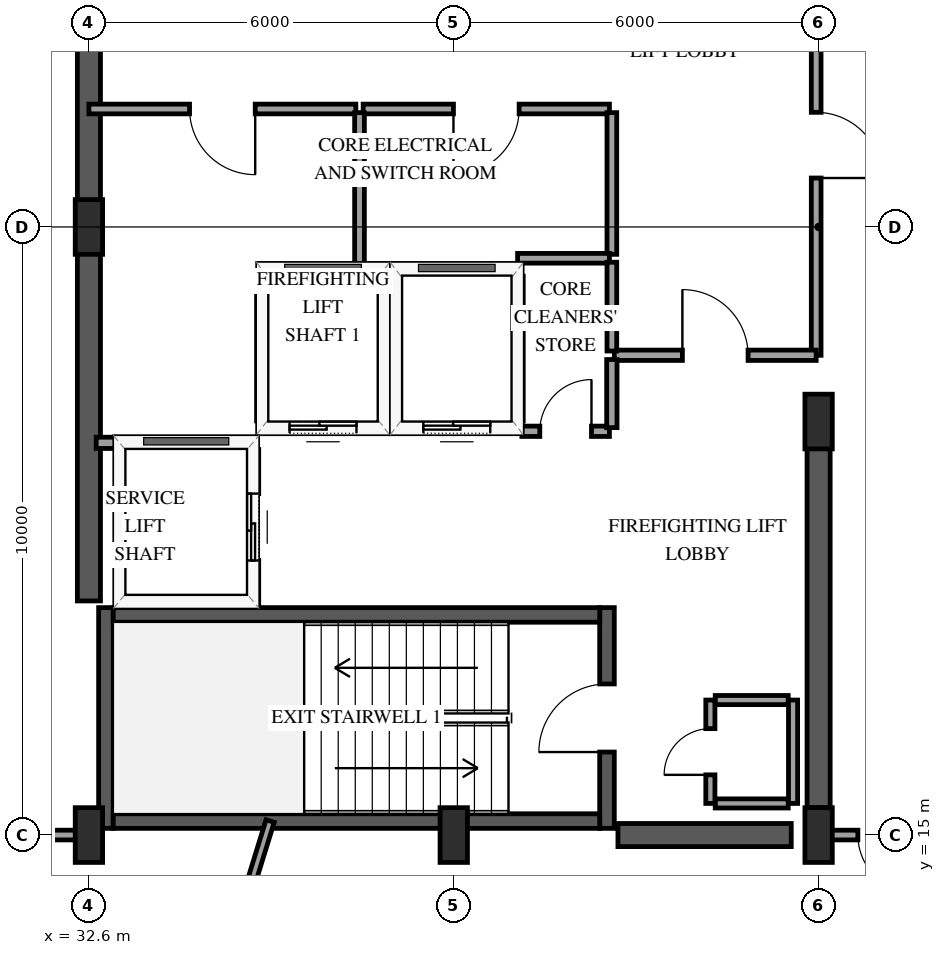
"""IFC4 building model, lengths in metres.
Left out: names, types, materials, properties, quantities, classifications, styles, units other than length and angle.
Written with IfcOpenShell. Run it as: python <this file> out.ifc"""

import sys

from ifc_helpers import new_model, si_unit, direction, frame, frame_2d, origin, origin_2d, place, context, subcontext, project, spatial, rectangle, extrude, element, fill, save


model = new_model("IFC4")
c1 = context("Model", 3, precision=1e-05, world=origin(), true_north=direction((0.0, 1.0)))
c2 = subcontext(c1, "Body", "Model", "MODEL_VIEW")
j1 = project(units=[si_unit("LENGTHUNIT", "METRE"), si_unit("PLANEANGLEUNIT", "RADIAN")], contexts=[c1])
p1 = place(None, origin())
s1 = spatial("IfcSite", under=j1, at=p1, CompositionType="ELEMENT")
p2 = place(p1, origin())
s2 = spatial("IfcBuilding", under=s1, at=p2, CompositionType="ELEMENT")
p3 = place(p2, frame((0.0, 0.0, 288.55)))
s3 = spatial("IfcBuildingStorey", under=s2, at=p3, CompositionType="ELEMENT", Elevation=288.55)
p4 = place(p3, frame((32.88, 15.11, 0.0), z_axis=(0.0, 0.0, 1.0), x_axis=(0.0, 1.0, 0.0)))
e1 = element("IfcWall", 1, at=p4, inside=s3, PredefinedType="SHEAR", context=c2, shape_type="SweptSolid", body=[
    extrude(rectangle(XDim=3.63, YDim=0.24, at=frame_2d((1.815, 0.0))), origin(), (0.0, 0.0, 1.0), 4.5),
])
p5 = place(p3, frame((41.12, 15.11, 0.0), z_axis=(0.0, 0.0, 1.0), x_axis=(0.0, 1.0, 0.0)))
e2 = element("IfcWall", 2, at=p5, inside=s3, PredefinedType="SHEAR", context=c2, shape_type="SweptSolid", body=[
    extrude(rectangle(XDim=3.63, YDim=0.24, at=frame_2d((1.815, 0.0))), origin(), (0.0, 0.0, 1.0), 4.5),
])
p6 = place(p5, frame((1.255, 0.0, 0.0)))
e3 = element("IfcOpeningElement", 3, at=p6, cuts=e2, PredefinedType="OPENING", context=c2, shape_type="SweptSolid", body=[
    extrude(rectangle(XDim=1.12, YDim=2.15, at=frame_2d((0.56, 1.075))), frame((0.0, 0.13, 0.0), z_axis=(0.0, -1.0, 0.0), x_axis=(1.0, 0.0, 0.0)), (0.0, 0.0, 1.0), 0.26),
])
for number, where, z_axis, x_axis in (
    (4, (33.0, 15.23, 0.0), (0.0, 0.0, 1.0), (1.0, 0.0, 0.0)),
    (5, (33.0, 18.62, 0.0), (0.0, 0.0, 1.0), (1.0, 0.0, 0.0)),
):
    element("IfcWall", number, at=place(p3, frame(where, z_axis=z_axis, x_axis=x_axis)), inside=s3, PredefinedType="SHEAR", context=c2, shape_type="SweptSolid", body=[
        extrude(rectangle(XDim=8.0, YDim=0.24, at=frame_2d((4.0, 0.0))), origin(), (0.0, 0.0, 1.0), 4.5),
    ])
p7 = place(p3, frame((32.6, 18.85, 0.0), z_axis=(0.0, 0.0, 1.0), x_axis=(0.0, 1.0, 0.0)))
e6 = element("IfcWall", 6, at=p7, inside=s3, PredefinedType="SHEAR", context=c2, shape_type="SweptSolid", body=[
    extrude(rectangle(XDim=12.3, YDim=0.38, at=frame_2d((6.15, 0.0))), origin(), (0.0, 0.0, 1.0), 4.5),
])
p8 = place(p3, frame((41.3, 15.0, 0.0), z_axis=(0.0, 0.0, 1.0), x_axis=(1.0, 0.0, 0.0)))
e7 = element("IfcWall", 7, at=p8, inside=s3, PredefinedType="SHEAR", context=c2, shape_type="SweptSolid", body=[
    extrude(rectangle(XDim=2.85, YDim=0.38, at=frame_2d((1.425, 0.0))), origin(), (0.0, 0.0, 1.0), 4.5),
])
p9 = place(p3, frame((44.6, 15.45, 0.0), z_axis=(0.0, 0.0, 1.0), x_axis=(0.0, 1.0, 0.0)))
e8 = element("IfcWall", 8, at=p9, inside=s3, PredefinedType="SHEAR", context=c2, shape_type="SweptSolid", body=[
    extrude(rectangle(XDim=6.35, YDim=0.38, at=frame_2d((3.175, 0.0))), origin(), (0.0, 0.0, 1.0), 4.5),
])
for number, where, z_axis, x_axis in (
    (9, (32.6, 15.0, 0.0), (0.0, 0.0, 1.0), (1.0, 0.0, 0.0)),
    (10, (32.6, 25.0, 0.0), (0.0, 0.0, 1.0), (1.0, 0.0, 0.0)),
    (11, (38.6, 15.0, 0.0), (0.0, 0.0, 1.0), (1.0, 0.0, 0.0)),
    (12, (44.6, 15.0, 0.0), (0.0, 0.0, 1.0), (1.0, 0.0, 0.0)),
    (13, (44.6, 21.8, 0.0), (0.0, 0.0, 1.0), (1.0, 0.0, 0.0)),
):
    element("IfcColumn", number, at=place(p3, frame(where, z_axis=z_axis, x_axis=x_axis)), inside=s3, PredefinedType="PILASTER", context=c2, shape_type="SweptSolid", body=[
        extrude(rectangle(XDim=0.45, YDim=0.9, at=origin_2d()), origin(), (0.0, 0.0, 1.0), 4.195),
    ])
p10 = place(p3, frame((35.45, 21.7, 0.0), z_axis=(0.0, 0.0, 1.0), x_axis=(1.0, 0.0, 0.0)))
e14 = element("IfcWall", 14, at=p10, inside=s3, PredefinedType="SOLIDWALL", context=c2, shape_type="SweptSolid", body=[
    extrude(rectangle(XDim=2.0, YDim=0.185, at=frame_2d((1.0, 0.0))), origin(), (0.0, 0.0, 1.0), 4.195),
])
p11 = place(p10, frame((0.45, 0.0, 0.0)))
e15 = element("IfcOpeningElement", 15, at=p11, cuts=e14, PredefinedType="OPENING", context=c2, shape_type="SweptSolid", body=[
    extrude(rectangle(XDim=1.1, YDim=2.15, at=frame_2d((0.55, 1.075))), frame((0.0, 0.103, 0.0), z_axis=(0.0, -1.0, 0.0), x_axis=(1.0, 0.0, 0.0)), (0.0, 0.0, 1.0), 0.205),
])
p12 = place(p3, frame((35.45, 24.3, 0.0), z_axis=(0.0, 0.0, 1.0), x_axis=(1.0, 0.0, 0.0)))
e16 = element("IfcWall", 16, at=p12, inside=s3, PredefinedType="SOLIDWALL", context=c2, shape_type="SweptSolid", body=[
    extrude(rectangle(XDim=2.0, YDim=0.185, at=frame_2d((1.0, 0.0))), origin(), (0.0, 0.0, 1.0), 4.195),
])
for number, where, z_axis, x_axis in (
    (17, (35.45, 21.81, 0.0), (0.0, 0.0, 1.0), (0.0, 1.0, 0.0)),
    (18, (37.45, 21.81, 0.0), (0.0, 0.0, 1.0), (0.0, 1.0, 0.0)),
):
    element("IfcWall", number, at=place(p3, frame(where, z_axis=z_axis, x_axis=x_axis)), inside=s3, PredefinedType="SOLIDWALL", context=c2, shape_type="SweptSolid", body=[
        extrude(rectangle(XDim=2.38, YDim=0.185, at=frame_2d((1.19, 0.0))), origin(), (0.0, 0.0, 1.0), 4.195),
    ])
p13 = place(p3, frame((37.65, 21.7, 0.0), z_axis=(0.0, 0.0, 1.0), x_axis=(1.0, 0.0, 0.0)))
e19 = element("IfcWall", 19, at=p13, inside=s3, PredefinedType="SOLIDWALL", context=c2, shape_type="SweptSolid", body=[
    extrude(rectangle(XDim=2.0, YDim=0.185, at=frame_2d((1.0, 0.0))), origin(), (0.0, 0.0, 1.0), 4.195),
])
p14 = place(p13, frame((0.45, 0.0, 0.0)))
e20 = element("IfcOpeningElement", 20, at=p14, cuts=e19, PredefinedType="OPENING", context=c2, shape_type="SweptSolid", body=[
    extrude(rectangle(XDim=1.1, YDim=2.15, at=frame_2d((0.55, 1.075))), frame((0.0, 0.103, 0.0), z_axis=(0.0, -1.0, 0.0), x_axis=(1.0, 0.0, 0.0)), (0.0, 0.0, 1.0), 0.205),
])
p15 = place(p3, frame((37.65, 24.3, 0.0), z_axis=(0.0, 0.0, 1.0), x_axis=(1.0, 0.0, 0.0)))
e21 = element("IfcWall", 21, at=p15, inside=s3, PredefinedType="SOLIDWALL", context=c2, shape_type="SweptSolid", body=[
    extrude(rectangle(XDim=2.0, YDim=0.185, at=frame_2d((1.0, 0.0))), origin(), (0.0, 0.0, 1.0), 4.195),
])
p16 = place(p3, frame((39.65, 21.81, 0.0), z_axis=(0.0, 0.0, 1.0), x_axis=(0.0, 1.0, 0.0)))
e22 = element("IfcWall", 22, at=p16, inside=s3, PredefinedType="SOLIDWALL", context=c2, shape_type="SweptSolid", body=[
    extrude(rectangle(XDim=2.38, YDim=0.185, at=frame_2d((1.19, 0.0))), origin(), (0.0, 0.0, 1.0), 4.195),
])
p17 = place(p3, frame((32.72, 21.45, 0.0), z_axis=(0.0, 0.0, 1.0), x_axis=(1.0, 0.0, 0.0)))
e23 = element("IfcWall", 23, at=p17, inside=s3, PredefinedType="SOLIDWALL", context=c2, shape_type="SweptSolid", body=[
    extrude(rectangle(XDim=2.58, YDim=0.185, at=frame_2d((1.29, 0.0))), origin(), (0.0, 0.0, 1.0), 4.195),
])
p18 = place(p3, frame((35.3, 18.79, 0.0), z_axis=(0.0, 0.0, 1.0), x_axis=(0.0, 1.0, 0.0)))
e24 = element("IfcWall", 24, at=p18, inside=s3, PredefinedType="SOLIDWALL", context=c2, shape_type="SweptSolid", body=[
    extrude(rectangle(XDim=2.55, YDim=0.185, at=frame_2d((1.275, 0.0))), origin(), (0.0, 0.0, 1.0), 4.195),
])
p19 = place(p18, frame((0.725, 0.0, 0.0)))
e25 = element("IfcOpeningElement", 25, at=p19, cuts=e24, PredefinedType="OPENING", context=c2, shape_type="SweptSolid", body=[
    extrude(rectangle(XDim=1.1, YDim=2.15, at=frame_2d((0.55, 1.075))), frame((0.0, 0.103, 0.0), z_axis=(0.0, -1.0, 0.0), x_axis=(1.0, 0.0, 0.0)), (0.0, 0.0, 1.0), 0.205),
])
for number, where, z_axis, x_axis in (
    (26, (42.9, 15.52, 0.0), (0.0, 0.0, 1.0), (1.0, 0.0, 0.0)),
    (27, (42.9, 17.22, 0.0), (0.0, 0.0, 1.0), (1.0, 0.0, 0.0)),
):
    element("IfcWall", number, at=place(p3, frame(where, z_axis=z_axis, x_axis=x_axis)), inside=s3, PredefinedType="PARTITIONING", context=c2, shape_type="SweptSolid", body=[
        extrude(rectangle(XDim=1.2, YDim=0.15, at=frame_2d((0.6, 0.0))), origin(), (0.0, 0.0, 1.0), 4.195),
    ])
p20 = place(p3, frame((44.18, 15.52, 0.0), z_axis=(0.0, 0.0, 1.0), x_axis=(0.0, 1.0, 0.0)))
e28 = element("IfcWall", 28, at=p20, inside=s3, PredefinedType="PARTITIONING", context=c2, shape_type="SweptSolid", body=[
    extrude(rectangle(XDim=1.7, YDim=0.15, at=frame_2d((0.85, 0.0))), origin(), (0.0, 0.0, 1.0), 4.195),
])
p21 = place(p3, frame((42.82, 15.52, 0.0), z_axis=(0.0, 0.0, 1.0), x_axis=(0.0, 1.0, 0.0)))
e29 = element("IfcWall", 29, at=p21, inside=s3, PredefinedType="PARTITIONING", context=c2, shape_type="SweptSolid", body=[
    extrude(rectangle(XDim=1.7, YDim=0.15, at=frame_2d((0.85, 0.0))), origin(), (0.0, 0.0, 1.0), 4.195),
])
p22 = place(p21, frame((0.47, 0.0, 0.0)))
e30 = element("IfcOpeningElement", 30, at=p22, cuts=e29, PredefinedType="OPENING", context=c2, shape_type="SweptSolid", body=[
    extrude(rectangle(XDim=0.76, YDim=2.0, at=frame_2d((0.38, 1.0))), frame((0.0, 0.085, 0.0), z_axis=(0.0, -1.0, 0.0), x_axis=(1.0, 0.0, 0.0)), (0.0, 0.0, 1.0), 0.17),
])
p23 = place(p3, frame((44.56, 29.8, 0.0), z_axis=(0.0, 0.0, 1.0), x_axis=(0.0, -1.0, 0.0)))
e31 = element("IfcWall", 31, at=p23, inside=s3, PredefinedType="PARTITIONING", context=c2, shape_type="SweptSolid", body=[
    extrude(rectangle(XDim=6.91, YDim=0.16, at=frame_2d((3.455, 0.0))), origin(), (0.0, 0.0, 1.0), 3.235),
])
p24 = place(p23, frame((2.915, 0.0, 0.0)))
e32 = element("IfcOpeningElement", 32, at=p24, cuts=e31, PredefinedType="OPENING", context=c2, shape_type="SweptSolid", body=[
    extrude(rectangle(XDim=1.08, YDim=2.15, at=frame_2d((0.54, 1.075))), frame((0.0, 0.09, 0.0), z_axis=(0.0, -1.0, 0.0), x_axis=(1.0, 0.0, 0.0)), (0.0, 0.0, 1.0), 0.18),
])
p25 = place(p3, frame((35.58, 15.23, 0.0), z_axis=(0.0, 0.0, 1.0), x_axis=(-0.295186233407, -0.955439735204, 0.0)))
e33 = element("IfcWall", 33, at=p25, inside=s3, PredefinedType="PARTITIONING", context=c2, shape_type="SweptSolid", body=[
    extrude(rectangle(XDim=4.692, YDim=0.14, at=frame_2d((2.346, 0.0))), origin(), (0.0, 0.0, 1.0), 2.485),
])
p26 = place(p3, frame((36.99, 26.94, 0.0), z_axis=(0.0, 0.0, 1.0), x_axis=(-1.0, 0.0, 0.0)))
e34 = element("IfcWall", 34, at=p26, inside=s3, PredefinedType="PARTITIONING", context=c2, shape_type="SweptSolid", body=[
    extrude(rectangle(XDim=4.39, YDim=0.16, at=frame_2d((2.195, 0.0))), origin(), (0.0, 0.0, 1.0), 4.195),
])
p27 = place(p26, frame((1.655, 0.0, 0.0)))
e35 = element("IfcOpeningElement", 35, at=p27, cuts=e34, PredefinedType="OPENING", context=c2, shape_type="SweptSolid", body=[
    extrude(rectangle(XDim=1.08, YDim=2.15, at=frame_2d((0.54, 1.075))), frame((0.0, 0.09, 0.0), z_axis=(0.0, -1.0, 0.0), x_axis=(1.0, 0.0, 0.0)), (0.0, 0.0, 1.0), 0.18),
])
p28 = place(p3, frame((41.16, 26.94, 0.0), z_axis=(0.0, 0.0, 1.0), x_axis=(-1.0, 0.0, 0.0)))
e36 = element("IfcWall", 36, at=p28, inside=s3, PredefinedType="PARTITIONING", context=c2, shape_type="SweptSolid", body=[
    extrude(rectangle(XDim=4.05, YDim=0.16, at=frame_2d((2.025, 0.0))), origin(), (0.0, 0.0, 1.0), 4.195),
])
p29 = place(p28, frame((1.485, 0.0, 0.0)))
e37 = element("IfcOpeningElement", 37, at=p29, cuts=e36, PredefinedType="OPENING", context=c2, shape_type="SweptSolid", body=[
    extrude(rectangle(XDim=1.08, YDim=2.15, at=frame_2d((0.54, 1.075))), frame((0.0, 0.09, 0.0), z_axis=(0.0, -1.0, 0.0), x_axis=(1.0, 0.0, 0.0)), (0.0, 0.0, 1.0), 0.18),
])
p30 = place(p3, frame((41.24, 22.89, 0.0), z_axis=(0.0, 0.0, 1.0), x_axis=(1.0, 0.0, 0.0)))
e38 = element("IfcWall", 38, at=p30, inside=s3, PredefinedType="PARTITIONING", context=c2, shape_type="SweptSolid", body=[
    extrude(rectangle(XDim=3.32, YDim=0.17, at=frame_2d((1.66, 0.0))), origin(), (0.0, 0.0, 1.0), 4.195),
])
p31 = place(p30, frame((1.12, 0.0, 0.0)))
e39 = element("IfcOpeningElement", 39, at=p31, cuts=e38, PredefinedType="OPENING", context=c2, shape_type="SweptSolid", body=[
    extrude(rectangle(XDim=1.08, YDim=2.15, at=frame_2d((0.54, 1.075))), frame((0.0, 0.095, 0.0), z_axis=(0.0, -1.0, 0.0), x_axis=(1.0, 0.0, 0.0)), (0.0, 0.0, 1.0), 0.19),
])
p32 = place(p3, frame((37.05, 26.88, 0.0), z_axis=(0.0, 0.0, 1.0), x_axis=(0.0, -1.0, 0.0)))
e40 = element("IfcWall", 40, at=p32, inside=s3, PredefinedType="PARTITIONING", context=c2, shape_type="SweptSolid", body=[
    extrude(rectangle(XDim=2.58, YDim=0.16, at=frame_2d((1.29, 0.0))), origin(), (0.0, 0.0, 1.0), 4.195),
])
p33 = place(p3, frame((41.2, 24.55, 0.0), z_axis=(0.0, 0.0, 1.0), x_axis=(0.0, 1.0, 0.0)))
e41 = element("IfcWall", 41, at=p33, inside=s3, PredefinedType="PARTITIONING", context=c2, shape_type="SweptSolid", body=[
    extrude(rectangle(XDim=2.33, YDim=0.16, at=frame_2d((1.165, 0.0))), origin(), (0.0, 0.0, 1.0), 4.195),
])
p34 = place(p3, frame((32.53, 15.0, 0.0), z_axis=(0.0, 0.0, 1.0), x_axis=(-1.0, 0.0, 0.0)))
e42 = element("IfcWall", 42, at=p34, inside=s3, PredefinedType="PARTITIONING", context=c2, shape_type="SweptSolid", body=[
    extrude(rectangle(XDim=1.91, YDim=0.16, at=frame_2d((0.955, 0.0))), origin(), (0.0, 0.0, 1.0), 4.195),
])
p35 = place(p3, frame((46.58, 15.0, 0.0), z_axis=(0.0, 0.0, 1.0), x_axis=(-1.0, 0.0, 0.0)))
e43 = element("IfcWall", 43, at=p35, inside=s3, PredefinedType="PARTITIONING", context=c2, shape_type="SweptSolid", body=[
    extrude(rectangle(XDim=1.91, YDim=0.16, at=frame_2d((0.955, 0.0))), origin(), (0.0, 0.0, 1.0), 4.195),
])
p36 = place(p35, frame((0.384, 0.0, 0.0)))
e44 = element("IfcOpeningElement", 44, at=p36, cuts=e43, PredefinedType="OPENING", context=c2, shape_type="SweptSolid", body=[
    extrude(rectangle(XDim=0.95, YDim=2.15, at=frame_2d((0.475, 1.075))), frame((0.0, 0.09, 0.0), z_axis=(0.0, -1.0, 0.0), x_axis=(1.0, 0.0, 0.0)), (0.0, 0.0, 1.0), 0.18),
])
p37 = place(p3, frame((39.65, 24.485, 0.0), z_axis=(0.0, 0.0, 1.0), x_axis=(1.0, 0.0, 0.0)))
e45 = element("IfcWall", 45, at=p37, inside=s3, PredefinedType="PARTITIONING", context=c2, shape_type="SweptSolid", body=[
    extrude(rectangle(XDim=1.51, YDim=0.16, at=frame_2d((0.755, 0.0))), origin(), (0.0, 0.0, 1.0), 4.195),
])
p38 = place(p3, frame((41.2, 22.96, 0.0), z_axis=(0.0, 0.0, 1.0), x_axis=(0.0, 1.0, 0.0)))
e46 = element("IfcWall", 46, at=p38, inside=s3, PredefinedType="PARTITIONING", context=c2, shape_type="SweptSolid", body=[
    extrude(rectangle(XDim=1.46, YDim=0.16, at=frame_2d((0.73, 0.0))), origin(), (0.0, 0.0, 1.0), 4.195),
])
p39 = place(p3, frame((39.72, 21.64, 0.0), z_axis=(0.0, 0.0, 1.0), x_axis=(1.0, 0.0, 0.0)))
e47 = element("IfcWall", 47, at=p39, inside=s3, PredefinedType="PARTITIONING", context=c2, shape_type="SweptSolid", body=[
    extrude(rectangle(XDim=1.44, YDim=0.17, at=frame_2d((0.72, 0.0))), origin(), (0.0, 0.0, 1.0), 4.195),
])
p40 = place(p39, frame((0.295, 0.0, 0.0)))
e48 = element("IfcOpeningElement", 48, at=p40, cuts=e47, PredefinedType="OPENING", context=c2, shape_type="SweptSolid", body=[
    extrude(rectangle(XDim=0.85, YDim=2.1, at=frame_2d((0.425, 1.05))), frame((0.0, 0.095, 0.0), z_axis=(0.0, -1.0, 0.0), x_axis=(1.0, 0.0, 0.0)), (0.0, 0.0, 1.0), 0.19),
])
p41 = place(p3, frame((41.2, 21.7, 0.0), z_axis=(0.0, 0.0, 1.0), x_axis=(0.0, 1.0, 0.0)))
e49 = element("IfcWall", 49, at=p41, inside=s3, PredefinedType="PARTITIONING", context=c2, shape_type="SweptSolid", body=[
    extrude(rectangle(XDim=1.12, YDim=0.17, at=frame_2d((0.56, 0.0))), origin(), (0.0, 0.0, 1.0), 4.195),
])
p42 = place(p11, origin())
e50 = element("IfcDoor", 50, at=p42, inside=s3, OperationType="SLIDING_TO_LEFT", PredefinedType="DOOR", context=c2, shape_type="SweptSolid", body=[
    extrude(rectangle(XDim=1.1, YDim=2.15, at=frame_2d((0.55, 1.075))), frame((0.0, 0.025, 0.0), z_axis=(0.0, -1.0, 0.0), x_axis=(1.0, 0.0, 0.0)), (0.0, 0.0, 1.0), 0.05),
])
fill(e15, e50)
p43 = place(p14, origin())
e51 = element("IfcDoor", 51, at=p43, inside=s3, OperationType="SLIDING_TO_LEFT", PredefinedType="DOOR", context=c2, shape_type="SweptSolid", body=[
    extrude(rectangle(XDim=1.1, YDim=2.15, at=frame_2d((0.55, 1.075))), frame((0.0, 0.025, 0.0), z_axis=(0.0, -1.0, 0.0), x_axis=(1.0, 0.0, 0.0)), (0.0, 0.0, 1.0), 0.05),
])
fill(e20, e51)
p44 = place(p19, origin())
e52 = element("IfcDoor", 52, at=p44, inside=s3, OperationType="SLIDING_TO_LEFT", PredefinedType="DOOR", context=c2, shape_type="SweptSolid", body=[
    extrude(rectangle(XDim=1.1, YDim=2.15, at=frame_2d((0.55, 1.075))), frame((0.0, 0.025, 0.0), z_axis=(0.0, -1.0, 0.0), x_axis=(1.0, 0.0, 0.0)), (0.0, 0.0, 1.0), 0.05),
])
fill(e25, e52)
p45 = place(p6, origin())
e53 = element("IfcDoor", 53, at=p45, inside=s3, OperationType="SINGLE_SWING_LEFT", PredefinedType="DOOR", context=c2, shape_type="SweptSolid", body=[
    extrude(rectangle(XDim=1.12, YDim=2.15, at=frame_2d((0.56, 1.075))), frame((0.0, 0.025, 0.0), z_axis=(0.0, -1.0, 0.0), x_axis=(1.0, 0.0, 0.0)), (0.0, 0.0, 1.0), 0.05),
])
fill(e3, e53)
p46 = place(p22, origin())
e54 = element("IfcDoor", 54, at=p46, inside=s3, OperationType="SINGLE_SWING_LEFT", PredefinedType="TRAPDOOR", context=c2, shape_type="SweptSolid", body=[
    extrude(rectangle(XDim=0.76, YDim=2.0, at=frame_2d((0.38, 1.0))), frame((0.0, 0.025, 0.0), z_axis=(0.0, -1.0, 0.0), x_axis=(1.0, 0.0, 0.0)), (0.0, 0.0, 1.0), 0.05),
])
fill(e30, e54)
p47 = place(p24, origin())
e55 = element("IfcDoor", 55, at=p47, inside=s3, OperationType="SINGLE_SWING_RIGHT", PredefinedType="DOOR", context=c2, shape_type="SweptSolid", body=[
    extrude(rectangle(XDim=1.08, YDim=2.15, at=frame_2d((0.54, 1.075))), frame((0.0, 0.025, 0.0), z_axis=(0.0, -1.0, 0.0), x_axis=(1.0, 0.0, 0.0)), (0.0, 0.0, 1.0), 0.05),
])
fill(e32, e55)
p48 = place(p27, origin())
e56 = element("IfcDoor", 56, at=p48, inside=s3, OperationType="SINGLE_SWING_LEFT", PredefinedType="DOOR", context=c2, shape_type="SweptSolid", body=[
    extrude(rectangle(XDim=1.08, YDim=2.15, at=frame_2d((0.54, 1.075))), frame((0.0, 0.025, 0.0), z_axis=(0.0, -1.0, 0.0), x_axis=(1.0, 0.0, 0.0)), (0.0, 0.0, 1.0), 0.05),
])
fill(e35, e56)
p49 = place(p29, origin())
e57 = element("IfcDoor", 57, at=p49, inside=s3, OperationType="SINGLE_SWING_RIGHT", PredefinedType="DOOR", context=c2, shape_type="SweptSolid", body=[
    extrude(rectangle(XDim=1.08, YDim=2.15, at=frame_2d((0.54, 1.075))), frame((0.0, 0.025, 0.0), z_axis=(0.0, -1.0, 0.0), x_axis=(1.0, 0.0, 0.0)), (0.0, 0.0, 1.0), 0.05),
])
fill(e37, e57)
p50 = place(p31, origin())
e58 = element("IfcDoor", 58, at=p50, inside=s3, OperationType="SINGLE_SWING_LEFT", PredefinedType="DOOR", context=c2, shape_type="SweptSolid", body=[
    extrude(rectangle(XDim=1.08, YDim=2.15, at=frame_2d((0.54, 1.075))), frame((0.0, 0.025, 0.0), z_axis=(0.0, -1.0, 0.0), x_axis=(1.0, 0.0, 0.0)), (0.0, 0.0, 1.0), 0.05),
])
fill(e39, e58)
p51 = place(p36, origin())
e59 = element("IfcDoor", 59, at=p51, inside=s3, OperationType="SINGLE_SWING_LEFT", PredefinedType="DOOR", context=c2, shape_type="SweptSolid", body=[
    extrude(rectangle(XDim=0.95, YDim=2.15, at=frame_2d((0.475, 1.075))), frame((0.0, 0.025, 0.0), z_axis=(0.0, -1.0, 0.0), x_axis=(1.0, 0.0, 0.0)), (0.0, 0.0, 1.0), 0.05),
])
fill(e44, e59)
p52 = place(p40, origin())
e60 = element("IfcDoor", 60, at=p52, inside=s3, OperationType="SINGLE_SWING_RIGHT", PredefinedType="DOOR", context=c2, shape_type="SweptSolid", body=[
    extrude(rectangle(XDim=0.85, YDim=2.1, at=frame_2d((0.425, 1.05))), frame((0.0, 0.025, 0.0), z_axis=(0.0, -1.0, 0.0), x_axis=(1.0, 0.0, 0.0)), (0.0, 0.0, 1.0), 0.05),
])
fill(e48, e60)
save(model, sys.argv[1])
